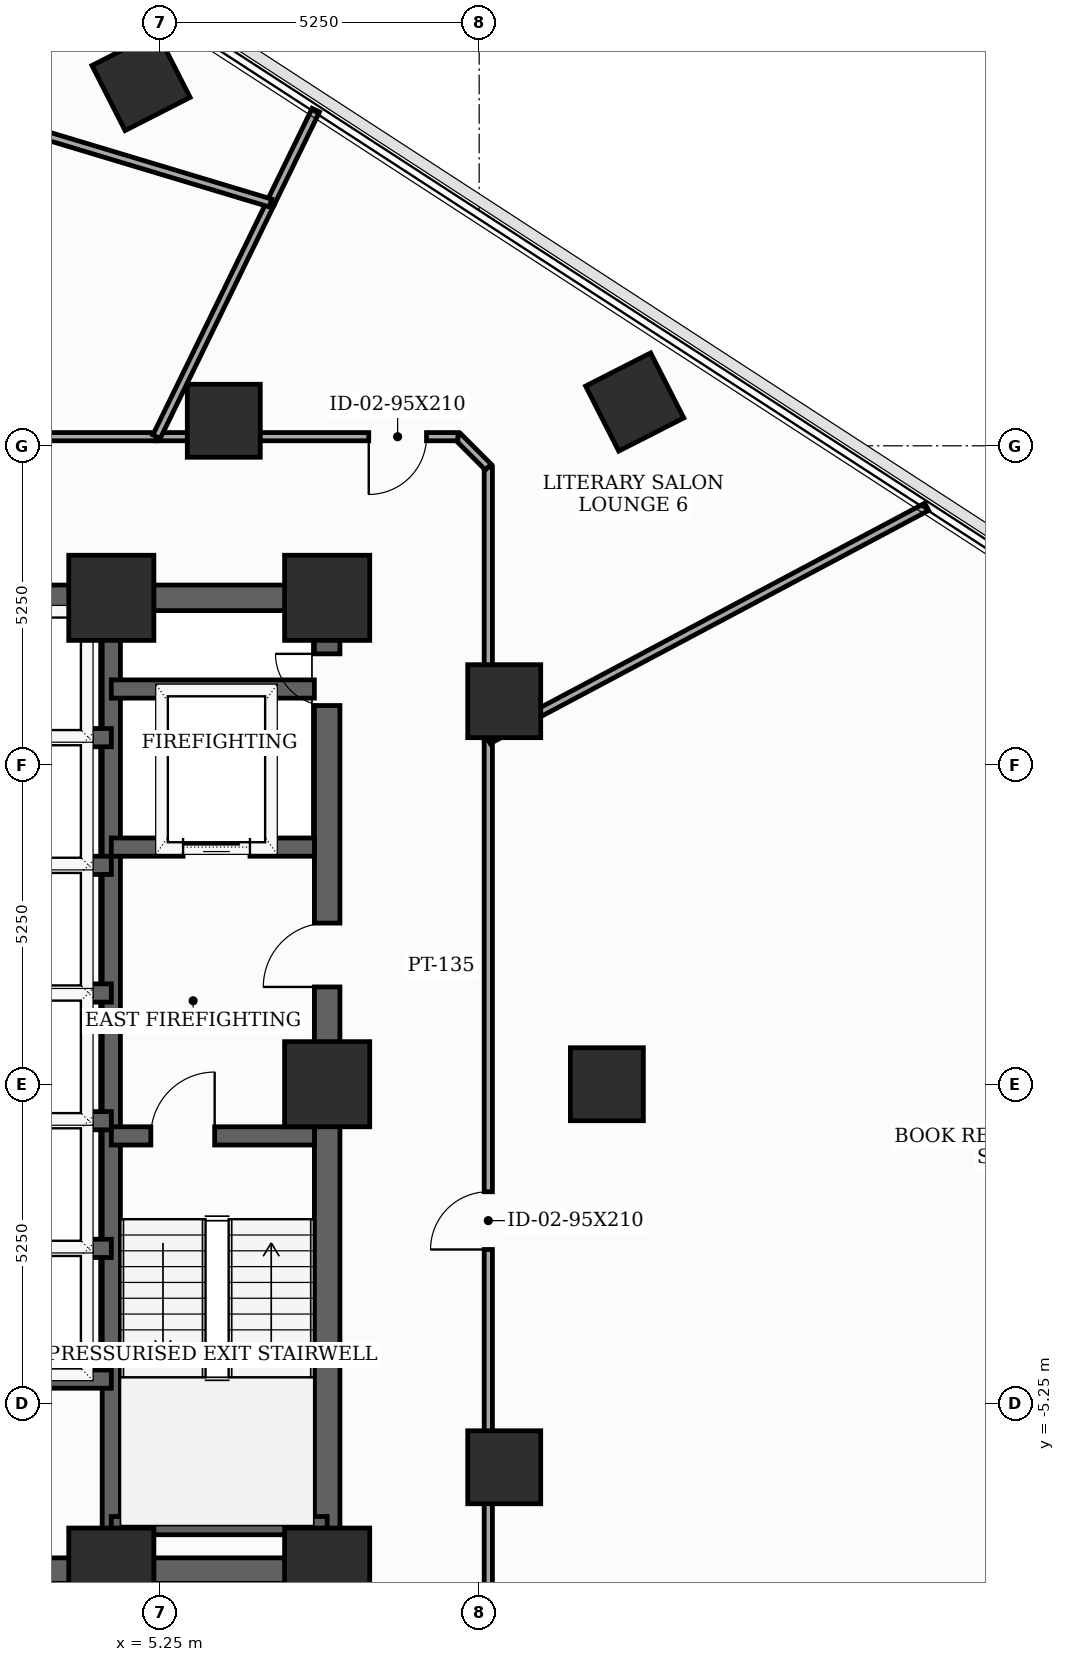
"""IFC4 building model, lengths in metres.
Left out: names, types, materials, properties, quantities, classifications, styles, units other than length and angle.
Written with IfcOpenShell. Run it as: python <this file> out.ifc"""

import sys

from ifc_helpers import new_model, si_unit, direction, frame, frame_2d, origin, origin_2d, place, context, subcontext, project, spatial, rectangle, extrude, element, fill, save


model = new_model("IFC4")
c1 = context("Model", 3, precision=1e-05, world=origin(), true_north=direction((0.0, 1.0)))
c2 = subcontext(c1, "Body", "Model", "MODEL_VIEW")
j1 = project(units=[si_unit("LENGTHUNIT", "METRE"), si_unit("PLANEANGLEUNIT", "RADIAN")], contexts=[c1])
p1 = place(None, origin())
s1 = spatial("IfcSite", under=j1, at=p1, CompositionType="ELEMENT")
p2 = place(p1, origin())
s2 = spatial("IfcBuilding", under=s1, at=p2, CompositionType="ELEMENT")
p3 = place(p2, frame((0.0, 0.0, 134.7)))
s3 = spatial("IfcBuildingStorey", under=s2, at=p3, CompositionType="ELEMENT", Elevation=134.7)
for number, where, z_axis, x_axis in (
    (1, (4.45, -8.0, 0.0), (0.0, 0.0, 1.0), (1.0, 0.0, 0.0)),
    (2, (8.0, -8.0, 0.0), (0.0, 0.0, 1.0), (1.0, 0.0, 0.0)),
    (3, (8.0, 0.0, 0.0), (0.0, 0.0, 1.0), (1.0, 0.0, 0.0)),
    (4, (8.0, 8.0, 0.0), (0.0, 0.0, 1.0), (1.0, 0.0, 0.0)),
    (5, (4.45, 8.0, 0.0), (0.0, 0.0, 1.0), (1.0, 0.0, 0.0)),
):
    element("IfcColumn", number, at=place(p3, frame(where, z_axis=z_axis, x_axis=x_axis)), inside=s3, PredefinedType="COLUMN", context=c2, shape_type="SweptSolid", body=[
        extrude(rectangle(XDim=1.4, YDim=1.4, at=origin_2d()), origin(), (0.0, 0.0, 1.0), 3.7),
    ])
for number, where, z_axis, x_axis in (
    (6, (12.6, 0.0, 0.0), (0.0, 0.0, 1.0), (1.0, 0.0, 0.0)),
    (7, (10.912, 6.3, 0.0), (0.0, 0.0, 1.0), (1.0, 0.0, 0.0)),
    (8, (6.3, 10.912, 0.0), (0.0, 0.0, 1.0), (1.0, 0.0, 0.0)),
    (9, (10.912, -6.3, 0.0), (0.0, 0.0, 1.0), (1.0, 0.0, 0.0)),
    (10, (13.058, 11.22, 0.0), (0.0, 0.0, 1.0), (0.891, 0.454, 0.0)),
    (11, (4.939, 16.492, 0.0), (0.0, 0.0, 1.0), (0.891, 0.454, 0.0)),
):
    element("IfcColumn", number, at=place(p3, frame(where, z_axis=z_axis, x_axis=x_axis)), inside=s3, PredefinedType="COLUMN", context=c2, shape_type="SweptSolid", body=[
        extrude(rectangle(XDim=1.2, YDim=1.2, at=origin_2d()), origin(), (0.0, 0.0, 1.0), 3.7),
    ])
p4 = place(p3, frame((8.0, -8.0, 0.0), z_axis=(0.0, 0.0, 1.0), x_axis=(0.0, 1.0, 0.0)))
e12 = element("IfcWall", 12, at=p4, inside=s3, PredefinedType="SHEAR", context=c2, shape_type="SweptSolid", body=[
    extrude(rectangle(XDim=16.0, YDim=0.42, at=frame_2d((8.0, 0.0))), origin(), (0.0, 0.0, 1.0), 3.5),
])
p5 = place(p4, frame((9.6, 0.0, 0.0)))
e13 = element("IfcOpeningElement", 13, at=p5, cuts=e12, PredefinedType="OPENING", context=c2, shape_type="SweptSolid", body=[
    extrude(rectangle(XDim=1.05, YDim=2.15, at=frame_2d((0.525, 1.075))), frame((0.0, 0.22, 0.0), z_axis=(0.0, -1.0, 0.0), x_axis=(1.0, 0.0, 0.0)), (0.0, 0.0, 1.0), 0.44),
])
p6 = place(p4, frame((14.229, 0.0, 0.0)))
e14 = element("IfcOpeningElement", 14, at=p6, cuts=e12, PredefinedType="OPENING", context=c2, shape_type="SweptSolid", body=[
    extrude(rectangle(XDim=0.85, YDim=2.02, at=frame_2d((0.425, 1.01))), frame((0.0, 0.22, 0.0), z_axis=(0.0, -1.0, 0.0), x_axis=(1.0, 0.0, 0.0)), (0.0, 0.0, 1.0), 0.44),
])
p7 = place(p3, frame((-8.0, -8.0, 0.0), z_axis=(0.0, 0.0, 1.0), x_axis=(1.0, 0.0, 0.0)))
e15 = element("IfcWall", 15, at=p7, inside=s3, PredefinedType="SHEAR", context=c2, shape_type="SweptSolid", body=[
    extrude(rectangle(XDim=16.0, YDim=0.42, at=frame_2d((8.0, 0.0))), origin(), (0.0, 0.0, 1.0), 3.5),
])
p8 = place(p7, frame((4.6, 0.0, 0.0)))
e16 = element("IfcOpeningElement", 16, at=p8, cuts=e15, PredefinedType="OPENING", context=c2, shape_type="SweptSolid", body=[
    extrude(rectangle(XDim=0.95, YDim=2.1, at=frame_2d((0.475, 1.05))), frame((0.0, 0.22, 0.0), z_axis=(0.0, -1.0, 0.0), x_axis=(1.0, 0.0, 0.0)), (0.0, 0.0, 1.0), 0.44),
])
p9 = place(p7, frame((7.52, 0.0, 0.0)))
e17 = element("IfcOpeningElement", 17, at=p9, cuts=e15, PredefinedType="OPENING", context=c2, shape_type="SweptSolid", body=[
    extrude(rectangle(XDim=0.95, YDim=2.1, at=frame_2d((0.475, 1.05))), frame((0.0, 0.22, 0.0), z_axis=(0.0, -1.0, 0.0), x_axis=(1.0, 0.0, 0.0)), (0.0, 0.0, 1.0), 0.44),
])
p10 = place(p7, frame((10.45, 0.0, 0.0)))
e18 = element("IfcOpeningElement", 18, at=p10, cuts=e15, PredefinedType="OPENING", context=c2, shape_type="SweptSolid", body=[
    extrude(rectangle(XDim=0.95, YDim=2.1, at=frame_2d((0.475, 1.05))), frame((0.0, 0.22, 0.0), z_axis=(0.0, -1.0, 0.0), x_axis=(1.0, 0.0, 0.0)), (0.0, 0.0, 1.0), 0.44),
])
p11 = place(p3, frame((-8.0, 8.0, 0.0), z_axis=(0.0, 0.0, 1.0), x_axis=(1.0, 0.0, 0.0)))
e19 = element("IfcWall", 19, at=p11, inside=s3, PredefinedType="SHEAR", context=c2, shape_type="SweptSolid", body=[
    extrude(rectangle(XDim=16.0, YDim=0.42, at=frame_2d((8.0, 0.0))), origin(), (0.0, 0.0, 1.0), 3.5),
])
p12 = place(p11, frame((7.1, 0.0, 0.0)))
e20 = element("IfcOpeningElement", 20, at=p12, cuts=e19, PredefinedType="OPENING", context=c2, shape_type="SweptSolid", body=[
    extrude(rectangle(XDim=1.8, YDim=2.15, at=frame_2d((0.9, 1.075))), frame((0.0, 0.22, 0.0), z_axis=(0.0, -1.0, 0.0), x_axis=(1.0, 0.0, 0.0)), (0.0, 0.0, 1.0), 0.44),
])
p13 = place(p3, frame((4.45, -7.79, 0.0), z_axis=(0.0, 0.0, 1.0), x_axis=(0.0, 1.0, 0.0)))
e21 = element("IfcWall", 21, at=p13, inside=s3, PredefinedType="SHEAR", context=c2, shape_type="SweptSolid", body=[
    extrude(rectangle(XDim=15.58, YDim=0.3, at=frame_2d((7.79, 0.0))), origin(), (0.0, 0.0, 1.0), 3.5),
])
p14 = place(p3, frame((4.45, -0.85, 0.0), z_axis=(0.0, 0.0, 1.0), x_axis=(1.0, 0.0, 0.0)))
e22 = element("IfcWall", 22, at=p14, inside=s3, PredefinedType="SHEAR", context=c2, shape_type="SweptSolid", body=[
    extrude(rectangle(XDim=3.34, YDim=0.3, at=frame_2d((1.67, 0.0))), origin(), (0.0, 0.0, 1.0), 3.5),
])
p15 = place(p14, frame((0.65, 0.0, 0.0)))
e23 = element("IfcOpeningElement", 23, at=p15, cuts=e22, PredefinedType="OPENING", context=c2, shape_type="SweptSolid", body=[
    extrude(rectangle(XDim=1.05, YDim=2.15, at=frame_2d((0.525, 1.075))), frame((0.0, 0.16, 0.0), z_axis=(0.0, -1.0, 0.0), x_axis=(1.0, 0.0, 0.0)), (0.0, 0.0, 1.0), 0.32),
])
p16 = place(p3, frame((4.45, -7.26, 0.0), z_axis=(0.0, 0.0, 1.0), x_axis=(1.0, 0.0, 0.0)))
e24 = element("IfcWall", 24, at=p16, inside=s3, PredefinedType="SHEAR", context=c2, shape_type="SweptSolid", body=[
    extrude(rectangle(XDim=3.55, YDim=0.3, at=frame_2d((1.775, 0.0))), origin(), (0.0, 0.0, 1.0), 3.5),
])
p17 = place(p3, frame((4.45, 3.9, 0.0), z_axis=(0.0, 0.0, 1.0), x_axis=(1.0, 0.0, 0.0)))
e25 = element("IfcWall", 25, at=p17, inside=s3, PredefinedType="SHEAR", context=c2, shape_type="SweptSolid", body=[
    extrude(rectangle(XDim=3.34, YDim=0.3, at=frame_2d((1.67, 0.0))), origin(), (0.0, 0.0, 1.0), 3.5),
])
p18 = place(p17, frame((1.18, 0.0, 0.0)))
e26 = element("IfcOpeningElement", 26, at=p18, cuts=e25, PredefinedType="OPENING", context=c2, shape_type="SweptSolid", body=[
    extrude(rectangle(XDim=1.1, YDim=2.1, at=frame_2d((0.55, 1.05))), frame((0.0, 0.16, 0.0), z_axis=(0.0, -1.0, 0.0), x_axis=(1.0, 0.0, 0.0)), (0.0, 0.0, 1.0), 0.32),
])
p19 = place(p3, frame((4.45, 6.5, 0.0), z_axis=(0.0, 0.0, 1.0), x_axis=(1.0, 0.0, 0.0)))
e27 = element("IfcWall", 27, at=p19, inside=s3, PredefinedType="SHEAR", context=c2, shape_type="SweptSolid", body=[
    extrude(rectangle(XDim=3.34, YDim=0.3, at=frame_2d((1.67, 0.0))), origin(), (0.0, 0.0, 1.0), 3.5),
])
p20 = place(p3, frame((-4.45, -4.85, 0.0), z_axis=(0.0, 0.0, 1.0), x_axis=(1.0, 0.0, 0.0)))
e28 = element("IfcWall", 28, at=p20, inside=s3, PredefinedType="SHEAR", context=c2, shape_type="SweptSolid", body=[
    extrude(rectangle(XDim=8.9, YDim=0.3, at=frame_2d((4.45, 0.0))), origin(), (0.0, 0.0, 1.0), 3.5),
])
for number, where, z_axis, x_axis in (
    (29, (1.68, 1.5, 0.0), (0.0, 0.0, 1.0), (1.0, 0.0, 0.0)),
    (30, (1.68, 3.6, 0.0), (0.0, 0.0, 1.0), (1.0, 0.0, 0.0)),
    (31, (1.68, 5.7, 0.0), (0.0, 0.0, 1.0), (1.0, 0.0, 0.0)),
    (32, (1.68, -2.7, 0.0), (0.0, 0.0, 1.0), (1.0, 0.0, 0.0)),
    (33, (1.68, -0.6, 0.0), (0.0, 0.0, 1.0), (1.0, 0.0, 0.0)),
):
    element("IfcWall", number, at=place(p3, frame(where, z_axis=z_axis, x_axis=x_axis)), inside=s3, PredefinedType="SHEAR", context=c2, shape_type="SweptSolid", body=[
        extrude(rectangle(XDim=2.77, YDim=0.3, at=frame_2d((1.385, 0.0))), origin(), (0.0, 0.0, 1.0), 3.5),
    ])
p21 = place(p3, frame((10.65, -10.15, 0.0), z_axis=(0.0, 0.0, 1.0), x_axis=(0.0, 1.0, 0.0)))
e34 = element("IfcWall", 34, at=p21, inside=s3, PredefinedType="PARTITIONING", context=c2, shape_type="SweptSolid", body=[
    extrude(rectangle(XDim=15.813, YDim=0.135, at=frame_2d((7.906, 0.0))), origin(), (0.0, 0.0, 1.0), 2.785),
])
p22 = place(p21, frame((7.431, 0.0, 0.0)))
e35 = element("IfcOpeningElement", 35, at=p22, cuts=e34, PredefinedType="OPENING", context=c2, shape_type="SweptSolid", body=[
    extrude(rectangle(XDim=0.95, YDim=2.1, at=frame_2d((0.475, 1.05))), frame((0.0, 0.077, 0.0), z_axis=(0.0, -1.0, 0.0), x_axis=(1.0, 0.0, 0.0)), (0.0, 0.0, 1.0), 0.155),
])
p23 = place(p3, frame((10.65, 5.663, 0.0), z_axis=(0.0, 0.0, 1.0), x_axis=(0.0, 1.0, 0.0)))
e36 = element("IfcWall", 36, at=p23, inside=s3, PredefinedType="PARTITIONING", context=c2, shape_type="SweptSolid", body=[
    extrude(rectangle(XDim=4.487, YDim=0.135, at=frame_2d((2.243, 0.0))), origin(), (0.0, 0.0, 1.0), 2.785),
])
p24 = place(p3, frame((10.65, 10.15, 0.0), z_axis=(0.0, 0.0, 1.0), x_axis=(-0.707106781187, 0.707106781187, 0.0)))
e37 = element("IfcWall", 37, at=p24, inside=s3, PredefinedType="PARTITIONING", context=c2, shape_type="SweptSolid", body=[
    extrude(rectangle(XDim=0.707, YDim=0.135, at=frame_2d((0.354, 0.0))), origin(), (0.0, 0.0, 1.0), 3.125),
])
p25 = place(p3, frame((10.15, 10.65, 0.0), z_axis=(0.0, 0.0, 1.0), x_axis=(-1.0, 0.0, 0.0)))
e38 = element("IfcWall", 38, at=p25, inside=s3, PredefinedType="PARTITIONING", context=c2, shape_type="SweptSolid", body=[
    extrude(rectangle(XDim=4.956, YDim=0.135, at=frame_2d((2.478, 0.0))), origin(), (0.0, 0.0, 1.0), 2.785),
])
p26 = place(p25, frame((0.516, 0.0, 0.0)))
e39 = element("IfcOpeningElement", 39, at=p26, cuts=e38, PredefinedType="OPENING", context=c2, shape_type="SweptSolid", body=[
    extrude(rectangle(XDim=0.95, YDim=2.1, at=frame_2d((0.475, 1.05))), frame((0.0, 0.077, 0.0), z_axis=(0.0, -1.0, 0.0), x_axis=(1.0, 0.0, 0.0)), (0.0, 0.0, 1.0), 0.155),
])
p27 = place(p3, frame((5.194, 10.65, 0.0), z_axis=(0.0, 0.0, 1.0), x_axis=(-1.0, 0.0, 0.0)))
e40 = element("IfcWall", 40, at=p27, inside=s3, PredefinedType="PARTITIONING", context=c2, shape_type="SweptSolid", body=[
    extrude(rectangle(XDim=7.849, YDim=0.135, at=frame_2d((3.925, 0.0))), origin(), (0.0, 0.0, 1.0), 2.785),
])
p28 = place(p27, frame((3.449, 0.0, 0.0)))
e41 = element("IfcOpeningElement", 41, at=p28, cuts=e40, PredefinedType="OPENING", context=c2, shape_type="SweptSolid", body=[
    extrude(rectangle(XDim=0.95, YDim=2.1, at=frame_2d((0.475, 1.05))), frame((0.0, 0.077, 0.0), z_axis=(0.0, -1.0, 0.0), x_axis=(1.0, 0.0, 0.0)), (0.0, 0.0, 1.0), 0.155),
])
p29 = place(p3, frame((17.86, 9.497, 0.0), z_axis=(0.0, 0.0, 1.0), x_axis=(-0.882966259968, -0.469436453376, 0.0)))
e42 = element("IfcWall", 42, at=p29, inside=s3, PredefinedType="PARTITIONING", context=c2, shape_type="SweptSolid", body=[
    extrude(rectangle(XDim=8.166, YDim=0.135, at=frame_2d((4.083, 0.0))), origin(), (0.0, 0.0, 1.0), 2.785),
])
p30 = place(p3, frame((7.069, 14.493, 0.0), z_axis=(0.0, 0.0, 1.0), x_axis=(-0.438491124388, -0.898735519401, 0.0)))
e43 = element("IfcWall", 43, at=p30, inside=s3, PredefinedType="PARTITIONING", context=c2, shape_type="SweptSolid", body=[
    extrude(rectangle(XDim=4.276, YDim=0.135, at=frame_2d((2.138, 0.0))), origin(), (0.0, 0.0, 1.0), 2.785),
])
p31 = place(p3, frame((7.813, 16.021, 0.0), z_axis=(0.0, 0.0, 1.0), x_axis=(-0.437939658317, -0.899004369107, 0.0)))
e44 = element("IfcWall", 44, at=p31, inside=s3, PredefinedType="PARTITIONING", context=c2, shape_type="SweptSolid", body=[
    extrude(rectangle(XDim=1.7, YDim=0.135, at=frame_2d((0.85, 0.0))), origin(), (0.0, 0.0, 1.0), 2.985),
])
p32 = place(p3, frame((7.069, 14.493, 0.0), z_axis=(0.0, 0.0, 1.0), x_axis=(-0.957562573124, 0.288225464789, 0.0)))
e45 = element("IfcWall", 45, at=p32, inside=s3, PredefinedType="PARTITIONING", context=c2, shape_type="SweptSolid", body=[
    extrude(rectangle(XDim=5.614, YDim=0.135, at=frame_2d((2.807, 0.0))), origin(), (0.0, 0.0, 1.0), 2.885),
])
p33 = place(p5, origin())
e46 = element("IfcDoor", 46, at=p33, inside=s3, OperationType="SINGLE_SWING_LEFT", PredefinedType="DOOR", context=c2, shape_type="SweptSolid", body=[
    extrude(rectangle(XDim=1.05, YDim=2.15, at=frame_2d((0.525, 1.075))), frame((0.0, 0.025, 0.0), z_axis=(0.0, -1.0, 0.0), x_axis=(1.0, 0.0, 0.0)), (0.0, 0.0, 1.0), 0.05),
])
fill(e13, e46)
p34 = place(p6, origin())
e47 = element("IfcDoor", 47, at=p34, inside=s3, OperationType="SINGLE_SWING_RIGHT", PredefinedType="TRAPDOOR", context=c2, shape_type="SweptSolid", body=[
    extrude(rectangle(XDim=0.85, YDim=2.02, at=frame_2d((0.425, 1.01))), frame((0.0, 0.025, 0.0), z_axis=(0.0, -1.0, 0.0), x_axis=(1.0, 0.0, 0.0)), (0.0, 0.0, 1.0), 0.05),
])
fill(e14, e47)
p35 = place(p15, origin())
e48 = element("IfcDoor", 48, at=p35, inside=s3, OperationType="SINGLE_SWING_RIGHT", PredefinedType="DOOR", context=c2, shape_type="SweptSolid", body=[
    extrude(rectangle(XDim=1.05, YDim=2.15, at=frame_2d((0.525, 1.075))), frame((0.0, 0.025, 0.0), z_axis=(0.0, -1.0, 0.0), x_axis=(1.0, 0.0, 0.0)), (0.0, 0.0, 1.0), 0.05),
])
fill(e23, e48)
p36 = place(p18, origin())
e49 = element("IfcDoor", 49, at=p36, inside=s3, OperationType="SLIDING_TO_LEFT", PredefinedType="DOOR", context=c2, shape_type="SweptSolid", body=[
    extrude(rectangle(XDim=1.1, YDim=2.1, at=frame_2d((0.55, 1.05))), frame((0.0, 0.025, 0.0), z_axis=(0.0, -1.0, 0.0), x_axis=(1.0, 0.0, 0.0)), (0.0, 0.0, 1.0), 0.05),
])
fill(e26, e49)
p37 = place(p22, origin())
e50 = element("IfcDoor", 50, at=p37, inside=s3, OperationType="SINGLE_SWING_LEFT", PredefinedType="DOOR", context=c2, shape_type="SweptSolid", body=[
    extrude(rectangle(XDim=0.95, YDim=2.1, at=frame_2d((0.475, 1.05))), frame((0.0, 0.025, 0.0), z_axis=(0.0, -1.0, 0.0), x_axis=(1.0, 0.0, 0.0)), (0.0, 0.0, 1.0), 0.05),
])
fill(e35, e50)
p38 = place(p26, origin())
e51 = element("IfcDoor", 51, at=p38, inside=s3, OperationType="SINGLE_SWING_RIGHT", PredefinedType="DOOR", context=c2, shape_type="SweptSolid", body=[
    extrude(rectangle(XDim=0.95, YDim=2.1, at=frame_2d((0.475, 1.05))), frame((0.0, 0.025, 0.0), z_axis=(0.0, -1.0, 0.0), x_axis=(1.0, 0.0, 0.0)), (0.0, 0.0, 1.0), 0.05),
])
fill(e39, e51)
save(model, sys.argv[1])
